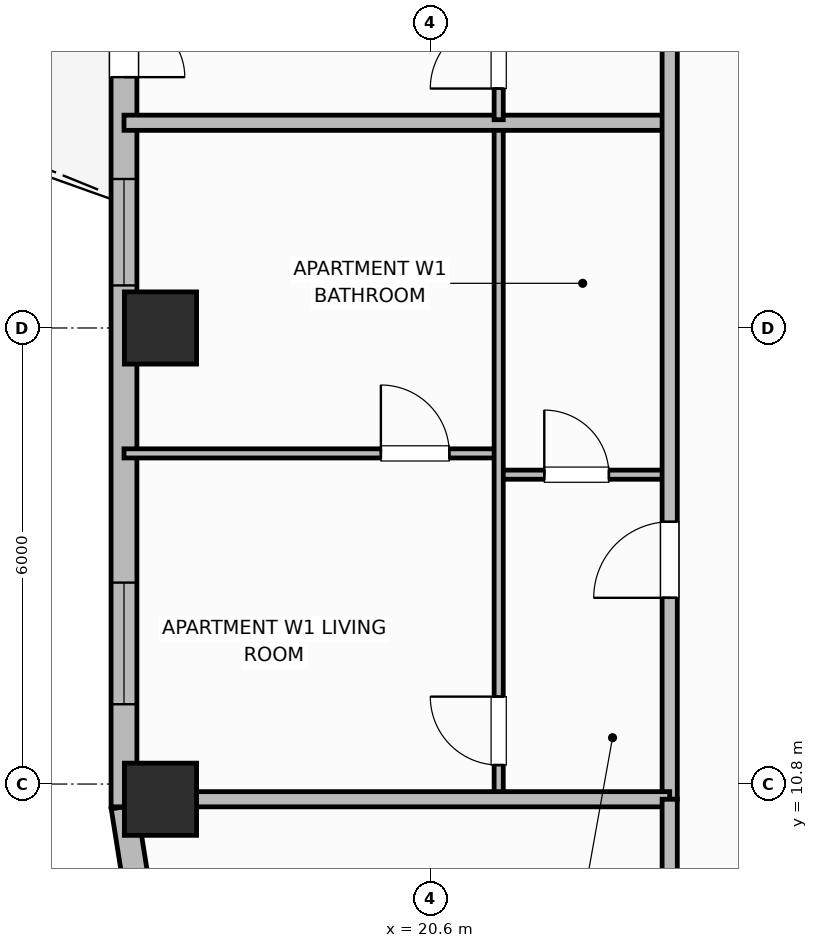
"""IFC4 building model, lengths in metres.
Left out: names, types, materials, properties, quantities, classifications, styles, units other than length and angle.
Written with IfcOpenShell. Run it as: python <this file> out.ifc"""

import sys

from ifc_helpers import new_model, si_unit, direction, frame, frame_2d, origin, origin_2d, place, context, subcontext, project, spatial, rectangle, extrude, element, fill, save


model = new_model("IFC4")
c1 = context("Model", 3, precision=1e-05, world=origin(), true_north=direction((0.0, 1.0)))
c2 = subcontext(c1, "Body", "Model", "MODEL_VIEW")
j1 = project(units=[si_unit("LENGTHUNIT", "METRE"), si_unit("PLANEANGLEUNIT", "RADIAN")], contexts=[c1])
p1 = place(None, origin())
s1 = spatial("IfcSite", under=j1, at=p1, CompositionType="ELEMENT")
p2 = place(p1, origin())
s2 = spatial("IfcBuilding", under=s1, at=p2, CompositionType="ELEMENT")
p3 = place(p2, frame((0.0, 0.0, 166.3)))
s3 = spatial("IfcBuildingStorey", under=s2, at=p3, CompositionType="ELEMENT", Elevation=166.3)
for number, where, z_axis, x_axis in (
    (1, (17.05, 10.6, 0.0), (0.0, 0.0, 1.0), (1.0, 0.0, 0.0)),
    (2, (17.05, 16.8, 0.0), (0.0, 0.0, 1.0), (1.0, 0.0, 0.0)),
):
    element("IfcColumn", number, at=place(p3, frame(where, z_axis=z_axis, x_axis=x_axis)), inside=s3, PredefinedType="COLUMN", context=c2, shape_type="SweptSolid", body=[
        extrude(rectangle(XDim=0.95, YDim=0.95, at=origin_2d()), origin(), (0.0, 0.0, 1.0), 3.7),
    ])
p4 = place(p3, frame((16.57, 10.5, 0.0), z_axis=(0.0, 0.0, 1.0), x_axis=(0.156514556949, -0.987675651954, 0.0)))
e3 = element("IfcWall", 3, at=p4, inside=s3, PredefinedType="SOLIDWALL", context=c2, shape_type="SweptSolid", body=[
    extrude(rectangle(XDim=1.135, YDim=0.34, at=frame_2d((0.568, 0.0))), origin(), (0.0, 0.0, 1.0), 2.72),
])
p5 = place(p3, frame((16.57, 23.8, 0.0), z_axis=(0.0, 0.0, 1.0), x_axis=(0.0, -1.0, 0.0)))
e4 = element("IfcWall", 4, at=p5, inside=s3, PredefinedType="SOLIDWALL", context=c2, shape_type="SweptSolid", body=[
    extrude(rectangle(XDim=13.3, YDim=0.34, at=frame_2d((6.65, 0.0))), origin(), (0.0, 0.0, 1.0), 2.72),
])
p6 = place(p5, frame((2.1, 0.0, 0.0)))
e5 = element("IfcOpeningElement", 5, at=p6, cuts=e4, PredefinedType="OPENING", context=c2, shape_type="SweptSolid", body=[
    extrude(rectangle(XDim=1.6, YDim=2.1, at=frame_2d((0.8, 1.05))), frame((0.0, 0.18, 0.0), z_axis=(0.0, -1.0, 0.0), x_axis=(1.0, 0.0, 0.0)), (0.0, 0.0, 1.0), 0.36),
])
p7 = place(p5, frame((5.04, 0.0, 0.71)))
e6 = element("IfcOpeningElement", 6, at=p7, cuts=e4, PredefinedType="OPENING", context=c2, shape_type="SweptSolid", body=[
    extrude(rectangle(XDim=1.4, YDim=1.85, at=frame_2d((0.7, 0.925))), frame((0.0, 0.18, 0.0), z_axis=(0.0, -1.0, 0.0), x_axis=(1.0, 0.0, 0.0)), (0.0, 0.0, 1.0), 0.36),
])
p8 = place(p5, frame((10.35, 0.0, 0.7)))
e7 = element("IfcOpeningElement", 7, at=p8, cuts=e4, PredefinedType="OPENING", context=c2, shape_type="SweptSolid", body=[
    extrude(rectangle(XDim=1.6, YDim=1.9, at=frame_2d((0.8, 0.95))), frame((0.0, 0.18, 0.0), z_axis=(0.0, -1.0, 0.0), x_axis=(1.0, 0.0, 0.0)), (0.0, 0.0, 1.0), 0.36),
])
p9 = place(p3, frame((21.5, 14.87, 0.0), z_axis=(0.0, 0.0, 1.0), x_axis=(1.0, 0.0, 0.0)))
e8 = element("IfcWall", 8, at=p9, inside=s3, PredefinedType="PARTITIONING", context=c2, shape_type="SweptSolid", body=[
    extrude(rectangle(XDim=2.25, YDim=0.12, at=frame_2d((1.125, 0.0))), origin(), (0.0, 0.0, 1.0), 2.55),
])
p10 = place(p9, frame((0.6, 0.0, 0.0)))
e9 = element("IfcOpeningElement", 9, at=p10, cuts=e8, PredefinedType="OPENING", context=c2, shape_type="SweptSolid", body=[
    extrude(rectangle(XDim=0.85, YDim=2.1, at=frame_2d((0.425, 1.05))), frame((0.0, 0.07, 0.0), z_axis=(0.0, -1.0, 0.0), x_axis=(1.0, 0.0, 0.0)), (0.0, 0.0, 1.0), 0.14),
])
p11 = place(p3, frame((16.57, 15.15, 0.0), z_axis=(0.0, 0.0, 1.0), x_axis=(1.0, 0.0, 0.0)))
e10 = element("IfcWall", 10, at=p11, inside=s3, PredefinedType="PARTITIONING", context=c2, shape_type="SweptSolid", body=[
    extrude(rectangle(XDim=4.93, YDim=0.12, at=frame_2d((2.465, 0.0))), origin(), (0.0, 0.0, 1.0), 2.55),
])
p12 = place(p11, frame((3.38, 0.0, 0.0)))
e11 = element("IfcOpeningElement", 11, at=p12, cuts=e10, PredefinedType="OPENING", context=c2, shape_type="SweptSolid", body=[
    extrude(rectangle(XDim=0.9, YDim=2.1, at=frame_2d((0.45, 1.05))), frame((0.0, 0.07, 0.0), z_axis=(0.0, -1.0, 0.0), x_axis=(1.0, 0.0, 0.0)), (0.0, 0.0, 1.0), 0.14),
])
p13 = place(p3, frame((21.5, 10.64, 0.0), z_axis=(0.0, 0.0, 1.0), x_axis=(0.0, 1.0, 0.0)))
e12 = element("IfcWall", 12, at=p13, inside=s3, PredefinedType="PARTITIONING", context=c2, shape_type="SweptSolid", body=[
    extrude(rectangle(XDim=8.82, YDim=0.12, at=frame_2d((4.41, 0.0))), origin(), (0.0, 0.0, 1.0), 2.55),
])
p14 = place(p13, frame((0.41, 0.0, 0.0)))
e13 = element("IfcOpeningElement", 13, at=p14, cuts=e12, PredefinedType="OPENING", context=c2, shape_type="SweptSolid", body=[
    extrude(rectangle(XDim=0.9, YDim=2.1, at=frame_2d((0.45, 1.05))), frame((0.0, 0.07, 0.0), z_axis=(0.0, -1.0, 0.0), x_axis=(1.0, 0.0, 0.0)), (0.0, 0.0, 1.0), 0.14),
])
p15 = place(p3, frame((16.57, 19.5, 0.0), z_axis=(0.0, 0.0, 1.0), x_axis=(1.0, 0.0, 0.0)))
e14 = element("IfcWall", 14, at=p15, inside=s3, PredefinedType="PARTITIONING", context=c2, shape_type="SweptSolid", body=[
    extrude(rectangle(XDim=7.18, YDim=0.2, at=frame_2d((3.59, 0.0))), origin(), (0.0, 0.0, 1.0), 2.55),
])
p16 = place(p3, frame((21.5, 19.54, 0.0), z_axis=(0.0, 0.0, 1.0), x_axis=(0.0, 1.0, 0.0)))
e15 = element("IfcWall", 15, at=p16, inside=s3, PredefinedType="PARTITIONING", context=c2, shape_type="SweptSolid", body=[
    extrude(rectangle(XDim=10.22, YDim=0.12, at=frame_2d((5.11, 0.0))), origin(), (0.0, 0.0, 1.0), 2.55),
])
p17 = place(p16, frame((0.41, 0.0, 0.0)))
e16 = element("IfcOpeningElement", 16, at=p17, cuts=e15, PredefinedType="OPENING", context=c2, shape_type="SweptSolid", body=[
    extrude(rectangle(XDim=0.9, YDim=2.1, at=frame_2d((0.45, 1.05))), frame((0.0, 0.07, 0.0), z_axis=(0.0, -1.0, 0.0), x_axis=(1.0, 0.0, 0.0)), (0.0, 0.0, 1.0), 0.14),
])
p18 = place(p3, frame((23.75, 10.6, 0.0), z_axis=(0.0, 0.0, 1.0), x_axis=(0.0, 1.0, 0.0)))
e17 = element("IfcWall", 17, at=p18, inside=s3, PredefinedType="PARTITIONING", context=c2, shape_type="SweptSolid", body=[
    extrude(rectangle(XDim=35.2, YDim=0.2, at=frame_2d((17.6, 0.0))), origin(), (0.0, 0.0, 1.0), 2.55),
])
p19 = place(p18, frame((2.65, 0.0, 0.0)))
e18 = element("IfcOpeningElement", 18, at=p19, cuts=e17, PredefinedType="OPENING", context=c2, shape_type="SweptSolid", body=[
    extrude(rectangle(XDim=1.0, YDim=2.15, at=frame_2d((0.5, 1.075))), frame((0.0, 0.11, 0.0), z_axis=(0.0, -1.0, 0.0), x_axis=(1.0, 0.0, 0.0)), (0.0, 0.0, 1.0), 0.22),
])
p20 = place(p18, frame((11.4, 0.0, 0.0)))
e19 = element("IfcOpeningElement", 19, at=p20, cuts=e17, PredefinedType="OPENING", context=c2, shape_type="SweptSolid", body=[
    extrude(rectangle(XDim=1.0, YDim=2.15, at=frame_2d((0.5, 1.075))), frame((0.0, 0.11, 0.0), z_axis=(0.0, -1.0, 0.0), x_axis=(1.0, 0.0, 0.0)), (0.0, 0.0, 1.0), 0.22),
])
p21 = place(p18, frame((21.37, 0.0, 0.0)))
e20 = element("IfcOpeningElement", 20, at=p21, cuts=e17, PredefinedType="OPENING", context=c2, shape_type="SweptSolid", body=[
    extrude(rectangle(XDim=1.0, YDim=2.15, at=frame_2d((0.5, 1.075))), frame((0.0, 0.11, 0.0), z_axis=(0.0, -1.0, 0.0), x_axis=(1.0, 0.0, 0.0)), (0.0, 0.0, 1.0), 0.22),
])
p22 = place(p18, frame((27.302, 0.0, 0.0)))
e21 = element("IfcOpeningElement", 21, at=p22, cuts=e17, PredefinedType="OPENING", context=c2, shape_type="SweptSolid", body=[
    extrude(rectangle(XDim=1.0, YDim=2.15, at=frame_2d((0.5, 1.075))), frame((0.0, 0.11, 0.0), z_axis=(0.0, -1.0, 0.0), x_axis=(1.0, 0.0, 0.0)), (0.0, 0.0, 1.0), 0.22),
])
p23 = place(p3, frame((16.99, 10.6, 0.0), z_axis=(0.0, 0.0, 1.0), x_axis=(1.0, 0.0, 0.0)))
e22 = element("IfcWall", 22, at=p23, inside=s3, PredefinedType="PARTITIONING", context=c2, shape_type="SweptSolid", body=[
    extrude(rectangle(XDim=6.76, YDim=0.2, at=frame_2d((3.38, 0.0))), origin(), (0.0, 0.0, 1.0), 2.55),
])
p24 = place(p3, frame((23.75, 6.87, 0.0), z_axis=(0.0, 0.0, 1.0), x_axis=(0.0, 1.0, 0.0)))
e23 = element("IfcWall", 23, at=p24, inside=s3, PredefinedType="PARTITIONING", context=c2, shape_type="SweptSolid", body=[
    extrude(rectangle(XDim=3.73, YDim=0.2, at=frame_2d((1.865, 0.0))), origin(), (0.0, 0.0, 1.0), 2.55),
])
p25 = place(p6, origin())
e24 = element("IfcDoor", 24, at=p25, inside=s3, OperationType="DOUBLE_DOOR_SINGLE_SWING", PredefinedType="DOOR", context=c2, shape_type="SweptSolid", body=[
    extrude(rectangle(XDim=1.6, YDim=2.1, at=frame_2d((0.8, 1.05))), frame((0.0, 0.025, 0.0), z_axis=(0.0, -1.0, 0.0), x_axis=(1.0, 0.0, 0.0)), (0.0, 0.0, 1.0), 0.05),
])
fill(e5, e24)
p26 = place(p7, origin())
e25 = element("IfcWindow", 25, at=p26, inside=s3, PartitioningType="SINGLE_PANEL", PredefinedType="WINDOW", context=c2, shape_type="SweptSolid", body=[
    extrude(rectangle(XDim=1.4, YDim=1.85, at=frame_2d((0.7, 0.925))), frame((0.0, 0.03, 0.0), z_axis=(0.0, -1.0, 0.0), x_axis=(1.0, 0.0, 0.0)), (0.0, 0.0, 1.0), 0.06),
])
fill(e6, e25)
p27 = place(p8, origin())
e26 = element("IfcWindow", 26, at=p27, inside=s3, PartitioningType="SINGLE_PANEL", PredefinedType="WINDOW", context=c2, shape_type="SweptSolid", body=[
    extrude(rectangle(XDim=1.6, YDim=1.9, at=frame_2d((0.8, 0.95))), frame((0.0, 0.03, 0.0), z_axis=(0.0, -1.0, 0.0), x_axis=(1.0, 0.0, 0.0)), (0.0, 0.0, 1.0), 0.06),
])
fill(e7, e26)
p28 = place(p10, origin())
e27 = element("IfcDoor", 27, at=p28, inside=s3, OperationType="SINGLE_SWING_LEFT", PredefinedType="DOOR", context=c2, shape_type="SweptSolid", body=[
    extrude(rectangle(XDim=0.85, YDim=2.1, at=frame_2d((0.425, 1.05))), frame((0.0, 0.025, 0.0), z_axis=(0.0, -1.0, 0.0), x_axis=(1.0, 0.0, 0.0)), (0.0, 0.0, 1.0), 0.05),
])
fill(e9, e27)
p29 = place(p12, origin())
e28 = element("IfcDoor", 28, at=p29, inside=s3, OperationType="SINGLE_SWING_LEFT", PredefinedType="DOOR", context=c2, shape_type="SweptSolid", body=[
    extrude(rectangle(XDim=0.9, YDim=2.1, at=frame_2d((0.45, 1.05))), frame((0.0, 0.025, 0.0), z_axis=(0.0, -1.0, 0.0), x_axis=(1.0, 0.0, 0.0)), (0.0, 0.0, 1.0), 0.05),
])
fill(e11, e28)
p30 = place(p14, origin())
e29 = element("IfcDoor", 29, at=p30, inside=s3, OperationType="SINGLE_SWING_RIGHT", PredefinedType="DOOR", context=c2, shape_type="SweptSolid", body=[
    extrude(rectangle(XDim=0.9, YDim=2.1, at=frame_2d((0.45, 1.05))), frame((0.0, 0.025, 0.0), z_axis=(0.0, -1.0, 0.0), x_axis=(1.0, 0.0, 0.0)), (0.0, 0.0, 1.0), 0.05),
])
fill(e13, e29)
p31 = place(p17, origin())
e30 = element("IfcDoor", 30, at=p31, inside=s3, OperationType="SINGLE_SWING_LEFT", PredefinedType="DOOR", context=c2, shape_type="SweptSolid", body=[
    extrude(rectangle(XDim=0.9, YDim=2.1, at=frame_2d((0.45, 1.05))), frame((0.0, 0.025, 0.0), z_axis=(0.0, -1.0, 0.0), x_axis=(1.0, 0.0, 0.0)), (0.0, 0.0, 1.0), 0.05),
])
fill(e16, e30)
p32 = place(p19, origin())
e31 = element("IfcDoor", 31, at=p32, inside=s3, OperationType="SINGLE_SWING_LEFT", PredefinedType="DOOR", context=c2, shape_type="SweptSolid", body=[
    extrude(rectangle(XDim=1.0, YDim=2.15, at=frame_2d((0.5, 1.075))), frame((0.0, 0.025, 0.0), z_axis=(0.0, -1.0, 0.0), x_axis=(1.0, 0.0, 0.0)), (0.0, 0.0, 1.0), 0.05),
])
fill(e18, e31)
save(model, sys.argv[1])
